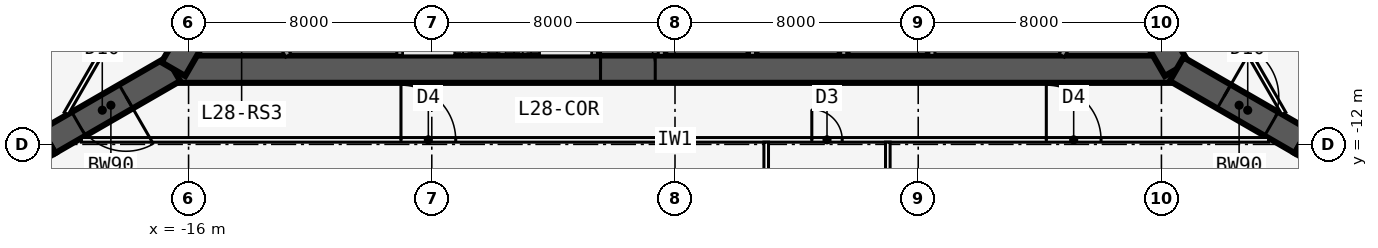
"""IFC4 building model, lengths in metres.
Left out: names, types, materials, properties, quantities, classifications, styles, units other than length and angle.
Written with IfcOpenShell. Run it as: python <this file> out.ifc"""

import sys

from ifc_helpers import new_model, si_unit, direction, frame, frame_2d, origin, place, context, subcontext, project, spatial, rectangle, extrude, element, fill, save


model = new_model("IFC4")
c1 = context("Model", 3, precision=1e-05, world=origin(), true_north=direction((0.0, 1.0)))
c2 = subcontext(c1, "Body", "Model", "MODEL_VIEW")
j1 = project(units=[si_unit("LENGTHUNIT", "METRE"), si_unit("PLANEANGLEUNIT", "RADIAN")], contexts=[c1])
p1 = place(None, origin())
s1 = spatial("IfcSite", under=j1, at=p1, CompositionType="ELEMENT")
p2 = place(p1, origin())
s2 = spatial("IfcBuilding", under=s1, at=p2, CompositionType="ELEMENT")
p3 = place(p2, frame((0.0, 0.0, 109.7)))
s3 = spatial("IfcBuildingStorey", under=s2, at=p3, CompositionType="ELEMENT", Elevation=109.7)
p4 = place(p3, frame((-16.5, -9.526, 0.0), z_axis=(0.0, 0.0, 1.0), x_axis=(1.0, 0.0, 0.0)))
e1 = element("IfcWall", 1, at=p4, inside=s3, PredefinedType="SHEAR", context=c2, shape_type="SweptSolid", body=[
    extrude(rectangle(XDim=33.0, YDim=0.9, at=frame_2d((16.5, 0.0))), origin(), (0.0, 0.0, 1.0), 5.0),
])
p5 = place(p4, frame((14.05, 0.0, 0.0)))
e2 = element("IfcOpeningElement", 2, at=p5, cuts=e1, PredefinedType="OPENING", context=c2, shape_type="SweptSolid", body=[
    extrude(rectangle(XDim=1.8, YDim=2.13, at=frame_2d((0.9, 1.065))), frame((0.0, 0.46, 0.0), z_axis=(0.0, -1.0, 0.0), x_axis=(1.0, 0.0, 0.0)), (0.0, 0.0, 1.0), 0.92),
])
p6 = place(p3, frame((-9.05, -5.951, 0.0), z_axis=(0.0, 0.0, 1.0), x_axis=(0.0, -1.0, 0.0)))
e3 = element("IfcWall", 3, at=p6, inside=s3, PredefinedType="SOLIDWALL", context=c2, shape_type="SweptSolid", body=[
    extrude(rectangle(XDim=3.125, YDim=0.2, at=frame_2d((1.562, 0.0))), origin(), (0.0, 0.0, 1.0), 4.835),
])
p7 = place(p3, frame((-2.65, -5.951, 0.0), z_axis=(0.0, 0.0, 1.0), x_axis=(0.0, -1.0, 0.0)))
e4 = element("IfcWall", 4, at=p7, inside=s3, PredefinedType="SOLIDWALL", context=c2, shape_type="SweptSolid", body=[
    extrude(rectangle(XDim=3.125, YDim=0.2, at=frame_2d((1.562, 0.0))), origin(), (0.0, 0.0, 1.0), 4.835),
])
p8 = place(p7, frame((1.525, 0.0, 0.0)))
e5 = element("IfcOpeningElement", 5, at=p8, cuts=e4, PredefinedType="OPENING", context=c2, shape_type="SweptSolid", body=[
    extrude(rectangle(XDim=1.0, YDim=2.13, at=frame_2d((0.5, 1.065))), frame((0.0, 0.11, 0.0), z_axis=(0.0, -1.0, 0.0), x_axis=(1.0, 0.0, 0.0)), (0.0, 0.0, 1.0), 0.22),
])
for number, where, z_axis, x_axis in (
    (6, (-0.45, -5.951, 0.0), (0.0, 0.0, 1.0), (0.0, -1.0, 0.0)),
    (7, (2.55, -5.951, 0.0), (0.0, 0.0, 1.0), (0.0, -1.0, 0.0)),
    (8, (5.55, -5.951, 0.0), (0.0, 0.0, 1.0), (0.0, -1.0, 0.0)),
    (9, (8.45, -5.951, 0.0), (0.0, 0.0, 1.0), (0.0, -1.0, 0.0)),
):
    element("IfcWall", number, at=place(p3, frame(where, z_axis=z_axis, x_axis=x_axis)), inside=s3, PredefinedType="SOLIDWALL", context=c2, shape_type="SweptSolid", body=[
        extrude(rectangle(XDim=3.125, YDim=0.2, at=frame_2d((1.562, 0.0))), origin(), (0.0, 0.0, 1.0), 4.835),
    ])
p9 = place(p3, frame((16.5, -9.526, 0.0), z_axis=(0.0, 0.0, 1.0), x_axis=(-0.499999749417, 0.866025548458, 0.0)))
e10 = element("IfcWall", 10, at=p9, inside=s3, PredefinedType="SHEAR", context=c2, shape_type="SweptSolid", body=[
    extrude(rectangle(XDim=33.0, YDim=0.9, at=frame_2d((16.5, 0.0))), origin(), (0.0, 0.0, 1.0), 5.0),
])
p10 = place(p9, frame((14.15, 0.0, 0.0)))
e11 = element("IfcOpeningElement", 11, at=p10, cuts=e10, PredefinedType="OPENING", context=c2, shape_type="SweptSolid", body=[
    extrude(rectangle(XDim=1.8, YDim=2.13, at=frame_2d((0.9, 1.065))), frame((0.0, 0.46, 0.0), z_axis=(0.0, -1.0, 0.0), x_axis=(1.0, 0.0, 0.0)), (0.0, 0.0, 1.0), 0.92),
])
p11 = place(p9, frame((12.6, 0.0, 0.0)))
e12 = element("IfcOpeningElement", 12, at=p11, cuts=e10, PredefinedType="OPENING", context=c2, shape_type="SweptSolid", body=[
    extrude(rectangle(XDim=1.0, YDim=2.13, at=frame_2d((0.5, 1.065))), frame((0.0, 0.46, 0.0), z_axis=(0.0, -1.0, 0.0), x_axis=(1.0, 0.0, 0.0)), (0.0, 0.0, 1.0), 0.92),
])
p12 = place(p3, frame((0.0, 19.052, 0.0), z_axis=(0.0, 0.0, 1.0), x_axis=(-0.499999749417, -0.866025548458, 0.0)))
e13 = element("IfcWall", 13, at=p12, inside=s3, PredefinedType="SHEAR", context=c2, shape_type="SweptSolid", body=[
    extrude(rectangle(XDim=33.0, YDim=0.9, at=frame_2d((16.5, 0.0))), origin(), (0.0, 0.0, 1.0), 5.0),
])
p13 = place(p12, frame((14.15, 0.0, 0.0)))
e14 = element("IfcOpeningElement", 14, at=p13, cuts=e13, PredefinedType="OPENING", context=c2, shape_type="SweptSolid", body=[
    extrude(rectangle(XDim=1.8, YDim=2.13, at=frame_2d((0.9, 1.065))), frame((0.0, 0.46, 0.0), z_axis=(0.0, -1.0, 0.0), x_axis=(1.0, 0.0, 0.0)), (0.0, 0.0, 1.0), 0.92),
])
p14 = place(p12, frame((12.6, 0.0, 0.0)))
e15 = element("IfcOpeningElement", 15, at=p14, cuts=e13, PredefinedType="OPENING", context=c2, shape_type="SweptSolid", body=[
    extrude(rectangle(XDim=1.0, YDim=2.13, at=frame_2d((0.5, 1.065))), frame((0.0, 0.46, 0.0), z_axis=(0.0, -1.0, 0.0), x_axis=(1.0, 0.0, 0.0)), (0.0, 0.0, 1.0), 0.92),
])
p15 = place(p3, frame((16.5, -9.526, 0.0), z_axis=(0.0, 0.0, 1.0), x_axis=(0.866031398331, -0.499989616998, 0.0)))
e16 = element("IfcWall", 16, at=p15, inside=s3, PredefinedType="SHEAR", context=c2, shape_type="SweptSolid", body=[
    extrude(rectangle(XDim=4.746, YDim=0.9, at=frame_2d((2.373, 0.0))), origin(), (0.0, 0.0, 1.0), 5.0),
])
p16 = place(p15, frame((1.8, 0.0, 0.0)))
e17 = element("IfcOpeningElement", 17, at=p16, cuts=e16, PredefinedType="OPENING", context=c2, shape_type="SweptSolid", body=[
    extrude(rectangle(XDim=1.8, YDim=2.13, at=frame_2d((0.9, 1.065))), frame((0.0, 0.46, 0.0), z_axis=(0.0, -1.0, 0.0), x_axis=(1.0, 0.0, 0.0)), (0.0, 0.0, 1.0), 0.92),
])
p17 = place(p3, frame((20.61, -11.899, 0.0), z_axis=(0.0, 0.0, 1.0), x_axis=(0.866009537788, -0.500027479704, 0.0)))
e18 = element("IfcWall", 18, at=p17, inside=s3, PredefinedType="SHEAR", context=c2, shape_type="SweptSolid", body=[
    extrude(rectangle(XDim=1.155, YDim=0.9, at=frame_2d((0.577, 0.0))), origin(), (0.0, 0.0, 1.0), 5.0),
])
p18 = place(p3, frame((-16.5, -9.526, 0.0), z_axis=(0.0, 0.0, 1.0), x_axis=(-0.866031398331, -0.499989616998, 0.0)))
e19 = element("IfcWall", 19, at=p18, inside=s3, PredefinedType="SHEAR", context=c2, shape_type="SweptSolid", body=[
    extrude(rectangle(XDim=4.746, YDim=0.9, at=frame_2d((2.373, 0.0))), origin(), (0.0, 0.0, 1.0), 5.0),
])
p19 = place(p18, frame((1.8, 0.0, 0.0)))
e20 = element("IfcOpeningElement", 20, at=p19, cuts=e19, PredefinedType="OPENING", context=c2, shape_type="SweptSolid", body=[
    extrude(rectangle(XDim=1.8, YDim=2.13, at=frame_2d((0.9, 1.065))), frame((0.0, 0.46, 0.0), z_axis=(0.0, -1.0, 0.0), x_axis=(1.0, 0.0, 0.0)), (0.0, 0.0, 1.0), 0.92),
])
p20 = place(p3, frame((-20.61, -11.899, 0.0), z_axis=(0.0, 0.0, 1.0), x_axis=(-0.866009537788, -0.500027479704, 0.0)))
e21 = element("IfcWall", 21, at=p20, inside=s3, PredefinedType="SHEAR", context=c2, shape_type="SweptSolid", body=[
    extrude(rectangle(XDim=1.155, YDim=0.9, at=frame_2d((0.577, 0.0))), origin(), (0.0, 0.0, 1.0), 5.0),
])
p21 = place(p3, frame((-19.527, -11.851, 0.0), z_axis=(0.0, 0.0, 1.0), x_axis=(1.0, 0.0, 0.0)))
e22 = element("IfcWall", 22, at=p21, inside=s3, PredefinedType="PARTITIONING", context=c2, shape_type="SweptSolid", body=[
    extrude(rectangle(XDim=39.054, YDim=0.15, at=frame_2d((19.527, 0.0))), origin(), (0.0, 0.0, 1.0), 4.835),
])
p22 = place(p21, frame((10.513, 0.0, 0.0)))
e23 = element("IfcOpeningElement", 23, at=p22, cuts=e22, PredefinedType="OPENING", context=c2, shape_type="SweptSolid", body=[
    extrude(rectangle(XDim=1.8, YDim=2.13, at=frame_2d((0.9, 1.065))), frame((0.0, 0.085, 0.0), z_axis=(0.0, -1.0, 0.0), x_axis=(1.0, 0.0, 0.0)), (0.0, 0.0, 1.0), 0.17),
])
p23 = place(p21, frame((24.027, 0.0, 0.0)))
e24 = element("IfcOpeningElement", 24, at=p23, cuts=e22, PredefinedType="OPENING", context=c2, shape_type="SweptSolid", body=[
    extrude(rectangle(XDim=1.0, YDim=2.13, at=frame_2d((0.5, 1.065))), frame((0.0, 0.085, 0.0), z_axis=(0.0, -1.0, 0.0), x_axis=(1.0, 0.0, 0.0)), (0.0, 0.0, 1.0), 0.17),
])
p24 = place(p21, frame((31.74, 0.0, 0.0)))
e25 = element("IfcOpeningElement", 25, at=p24, cuts=e22, PredefinedType="OPENING", context=c2, shape_type="SweptSolid", body=[
    extrude(rectangle(XDim=1.8, YDim=2.13, at=frame_2d((0.9, 1.065))), frame((0.0, 0.085, 0.0), z_axis=(0.0, -1.0, 0.0), x_axis=(1.0, 0.0, 0.0)), (0.0, 0.0, 1.0), 0.17),
])
p25 = place(p3, frame((3.0, -11.926, 0.0), z_axis=(0.0, 0.0, 1.0), x_axis=(0.0, -1.0, 0.0)))
e26 = element("IfcWall", 26, at=p25, inside=s3, PredefinedType="PARTITIONING", context=c2, shape_type="SweptSolid", body=[
    extrude(rectangle(XDim=9.046, YDim=0.15, at=frame_2d((4.523, 0.0))), origin(), (0.0, 0.0, 1.0), 4.835),
])
p26 = place(p3, frame((7.0, -11.926, 0.0), z_axis=(0.0, 0.0, 1.0), x_axis=(0.0, -1.0, 0.0)))
e27 = element("IfcWall", 27, at=p26, inside=s3, PredefinedType="PARTITIONING", context=c2, shape_type="SweptSolid", body=[
    extrude(rectangle(XDim=8.76, YDim=0.15, at=frame_2d((4.38, 0.0))), origin(), (0.0, 0.0, 1.0), 4.835),
])
p27 = place(p3, frame((20.027, -10.985, 0.0), z_axis=(0.0, 0.0, 1.0), x_axis=(-0.500001677587, 0.866024435227, 0.0)))
e28 = element("IfcWall", 28, at=p27, inside=s3, PredefinedType="PARTITIONING", context=c2, shape_type="SweptSolid", body=[
    extrude(rectangle(XDim=39.054, YDim=0.15, at=frame_2d((19.527, 0.0))), origin(), (0.0, 0.0, 1.0), 4.835),
])
p28 = place(p27, frame((6.513, 0.0, 0.0)))
e29 = element("IfcOpeningElement", 29, at=p28, cuts=e28, PredefinedType="OPENING", context=c2, shape_type="SweptSolid", body=[
    extrude(rectangle(XDim=1.8, YDim=2.13, at=frame_2d((0.9, 1.065))), frame((0.0, 0.085, 0.0), z_axis=(0.0, -1.0, 0.0), x_axis=(1.0, 0.0, 0.0)), (0.0, 0.0, 1.0), 0.17),
])
p29 = place(p27, frame((16.527, 0.0, 0.0)))
e30 = element("IfcOpeningElement", 30, at=p29, cuts=e28, PredefinedType="OPENING", context=c2, shape_type="SweptSolid", body=[
    extrude(rectangle(XDim=1.0, YDim=2.13, at=frame_2d((0.5, 1.065))), frame((0.0, 0.085, 0.0), z_axis=(0.0, -1.0, 0.0), x_axis=(1.0, 0.0, 0.0)), (0.0, 0.0, 1.0), 0.17),
])
p30 = place(p27, frame((21.527, 0.0, 0.0)))
e31 = element("IfcOpeningElement", 31, at=p30, cuts=e28, PredefinedType="OPENING", context=c2, shape_type="SweptSolid", body=[
    extrude(rectangle(XDim=1.0, YDim=2.13, at=frame_2d((0.5, 1.065))), frame((0.0, 0.085, 0.0), z_axis=(0.0, -1.0, 0.0), x_axis=(1.0, 0.0, 0.0)), (0.0, 0.0, 1.0), 0.17),
])
p31 = place(p27, frame((25.527, 0.0, 0.0)))
e32 = element("IfcOpeningElement", 32, at=p31, cuts=e28, PredefinedType="OPENING", context=c2, shape_type="SweptSolid", body=[
    extrude(rectangle(XDim=1.0, YDim=2.13, at=frame_2d((0.5, 1.065))), frame((0.0, 0.085, 0.0), z_axis=(0.0, -1.0, 0.0), x_axis=(1.0, 0.0, 0.0)), (0.0, 0.0, 1.0), 0.17),
])
p32 = place(p27, frame((32.24, 0.0, 0.0)))
e33 = element("IfcOpeningElement", 33, at=p32, cuts=e28, PredefinedType="OPENING", context=c2, shape_type="SweptSolid", body=[
    extrude(rectangle(XDim=1.8, YDim=2.13, at=frame_2d((0.9, 1.065))), frame((0.0, 0.085, 0.0), z_axis=(0.0, -1.0, 0.0), x_axis=(1.0, 0.0, 0.0)), (0.0, 0.0, 1.0), 0.17),
])
p33 = place(p3, frame((-0.5, 22.836, 0.0), z_axis=(0.0, 0.0, 1.0), x_axis=(-0.500001677587, -0.866024435227, 0.0)))
e34 = element("IfcWall", 34, at=p33, inside=s3, PredefinedType="PARTITIONING", context=c2, shape_type="SweptSolid", body=[
    extrude(rectangle(XDim=39.054, YDim=0.15, at=frame_2d((19.527, 0.0))), origin(), (0.0, 0.0, 1.0), 4.835),
])
p34 = place(p33, frame((6.414, 0.0, 0.0)))
e35 = element("IfcOpeningElement", 35, at=p34, cuts=e34, PredefinedType="OPENING", context=c2, shape_type="SweptSolid", body=[
    extrude(rectangle(XDim=1.0, YDim=2.13, at=frame_2d((0.5, 1.065))), frame((0.0, 0.085, 0.0), z_axis=(0.0, -1.0, 0.0), x_axis=(1.0, 0.0, 0.0)), (0.0, 0.0, 1.0), 0.17),
])
p35 = place(p33, frame((15.527, 0.0, 0.0)))
e36 = element("IfcOpeningElement", 36, at=p35, cuts=e34, PredefinedType="OPENING", context=c2, shape_type="SweptSolid", body=[
    extrude(rectangle(XDim=1.0, YDim=2.13, at=frame_2d((0.5, 1.065))), frame((0.0, 0.085, 0.0), z_axis=(0.0, -1.0, 0.0), x_axis=(1.0, 0.0, 0.0)), (0.0, 0.0, 1.0), 0.17),
])
p36 = place(p33, frame((21.277, 0.0, 0.0)))
e37 = element("IfcOpeningElement", 37, at=p36, cuts=e34, PredefinedType="OPENING", context=c2, shape_type="SweptSolid", body=[
    extrude(rectangle(XDim=1.0, YDim=2.13, at=frame_2d((0.5, 1.065))), frame((0.0, 0.085, 0.0), z_axis=(0.0, -1.0, 0.0), x_axis=(1.0, 0.0, 0.0)), (0.0, 0.0, 1.0), 0.17),
])
p37 = place(p33, frame((31.39, 0.0, 0.0)))
e38 = element("IfcOpeningElement", 38, at=p37, cuts=e34, PredefinedType="OPENING", context=c2, shape_type="SweptSolid", body=[
    extrude(rectangle(XDim=1.0, YDim=2.13, at=frame_2d((0.5, 1.065))), frame((0.0, 0.085, 0.0), z_axis=(0.0, -1.0, 0.0), x_axis=(1.0, 0.0, 0.0)), (0.0, 0.0, 1.0), 0.17),
])
for number, where, z_axis, x_axis in (
    (39, (14.219, -6.476, 0.0), (0.0, 0.0, 1.0), (-0.5, -0.866, 0.0)),
    (40, (-12.719, -9.076, 0.0), (0.0, 0.0, 1.0), (-0.5, 0.866, 0.0)),
):
    element("IfcWall", number, at=place(p3, frame(where, z_axis=z_axis, x_axis=x_axis)), inside=s3, PredefinedType="SOLIDWALL", context=c2, shape_type="SweptSolid", body=[
        extrude(rectangle(XDim=3.002, YDim=0.2, at=frame_2d((1.501, 0.0))), origin(), (0.0, 0.0, 1.0), 4.835),
    ])
p38 = place(p22, origin())
e41 = element("IfcDoor", 41, at=p38, inside=s3, OperationType="DOUBLE_DOOR_SINGLE_SWING", PredefinedType="DOOR", context=c2, shape_type="SweptSolid", body=[
    extrude(rectangle(XDim=1.8, YDim=2.13, at=frame_2d((0.9, 1.065))), frame((0.0, 0.025, 0.0), z_axis=(0.0, -1.0, 0.0), x_axis=(1.0, 0.0, 0.0)), (0.0, 0.0, 1.0), 0.05),
])
fill(e23, e41)
p39 = place(p23, origin())
e42 = element("IfcDoor", 42, at=p39, inside=s3, OperationType="SINGLE_SWING_LEFT", PredefinedType="DOOR", context=c2, shape_type="SweptSolid", body=[
    extrude(rectangle(XDim=1.0, YDim=2.13, at=frame_2d((0.5, 1.065))), frame((0.0, 0.025, 0.0), z_axis=(0.0, -1.0, 0.0), x_axis=(1.0, 0.0, 0.0)), (0.0, 0.0, 1.0), 0.05),
])
fill(e24, e42)
p40 = place(p24, origin())
e43 = element("IfcDoor", 43, at=p40, inside=s3, OperationType="DOUBLE_DOOR_SINGLE_SWING", PredefinedType="DOOR", context=c2, shape_type="SweptSolid", body=[
    extrude(rectangle(XDim=1.8, YDim=2.13, at=frame_2d((0.9, 1.065))), frame((0.0, 0.025, 0.0), z_axis=(0.0, -1.0, 0.0), x_axis=(1.0, 0.0, 0.0)), (0.0, 0.0, 1.0), 0.05),
])
fill(e25, e43)
p41 = place(p5, origin())
e44 = element("IfcDoor", 44, at=p41, inside=s3, OperationType="DOUBLE_DOOR_SINGLE_SWING", PredefinedType="DOOR", context=c2, shape_type="SweptSolid", body=[
    extrude(rectangle(XDim=1.8, YDim=2.13, at=frame_2d((0.9, 1.065))), frame((0.0, 0.025, 0.0), z_axis=(0.0, -1.0, 0.0), x_axis=(1.0, 0.0, 0.0)), (0.0, 0.0, 1.0), 0.05),
])
fill(e2, e44)
p42 = place(p16, origin())
e45 = element("IfcDoor", 45, at=p42, inside=s3, OperationType="DOUBLE_DOOR_DOUBLE_SWING", PredefinedType="DOOR", context=c2, shape_type="SweptSolid", body=[
    extrude(rectangle(XDim=1.8, YDim=2.13, at=frame_2d((0.9, 1.065))), frame((0.0, 0.025, 0.0), z_axis=(0.0, -1.0, 0.0), x_axis=(1.0, 0.0, 0.0)), (0.0, 0.0, 1.0), 0.05),
])
fill(e17, e45)
p43 = place(p19, origin())
e46 = element("IfcDoor", 46, at=p43, inside=s3, OperationType="DOUBLE_DOOR_DOUBLE_SWING", PredefinedType="DOOR", context=c2, shape_type="SweptSolid", body=[
    extrude(rectangle(XDim=1.8, YDim=2.13, at=frame_2d((0.9, 1.065))), frame((0.0, 0.025, 0.0), z_axis=(0.0, -1.0, 0.0), x_axis=(1.0, 0.0, 0.0)), (0.0, 0.0, 1.0), 0.05),
])
fill(e20, e46)
save(model, sys.argv[1])
